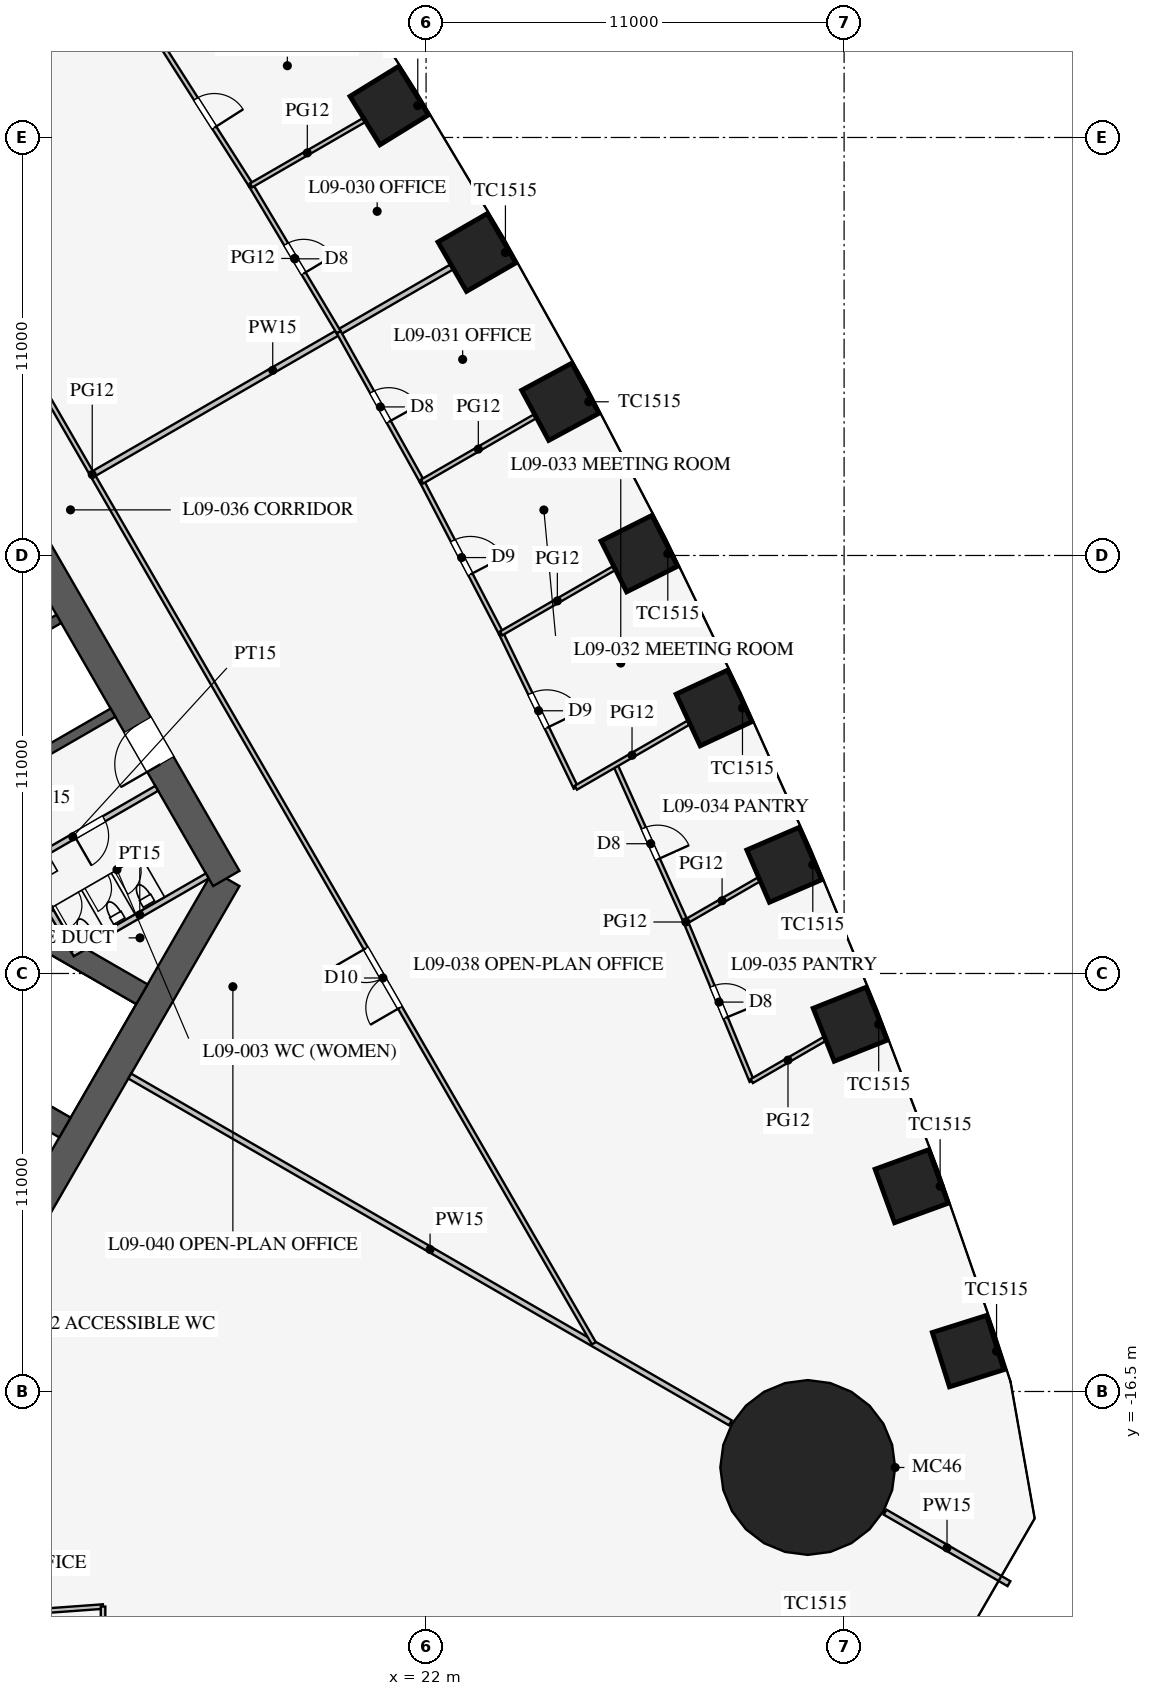
"""IFC4 building model, lengths in metres.
Left out: names, types, materials, properties, quantities, classifications, styles, units other than length and angle.
Written with IfcOpenShell. Run it as: python <this file> out.ifc"""

import sys

from ifc_helpers import new_model, si_unit, direction, frame, frame_2d, origin, origin_2d, place, context, subcontext, project, spatial, rectangle, circle, extrude, element, fill, save


model = new_model("IFC4")
c1 = context("Model", 3, precision=1e-05, world=origin(), true_north=direction((0.0, 1.0)))
c2 = subcontext(c1, "Body", "Model", "MODEL_VIEW")
j1 = project(units=[si_unit("LENGTHUNIT", "METRE"), si_unit("PLANEANGLEUNIT", "RADIAN")], contexts=[c1])
p1 = place(None, origin())
s1 = spatial("IfcSite", under=j1, at=p1, CompositionType="ELEMENT")
p2 = place(p1, origin())
s2 = spatial("IfcBuilding", under=s1, at=p2, CompositionType="ELEMENT")
p3 = place(p2, frame((0.0, 0.0, 41.7)))
s3 = spatial("IfcBuildingStorey", under=s2, at=p3, CompositionType="ELEMENT", Elevation=41.7)
for number, where, z_axis, x_axis in (
    (1, (36.262, -15.438, 0.0), (0.0, 0.0, 1.0), (-0.3, 0.954, 0.0)),
    (2, (34.776, -11.099, 0.0), (0.0, 0.0, 1.0), (-0.342, 0.94, 0.0)),
    (3, (33.16, -6.836, 0.0), (0.0, 0.0, 1.0), (-0.369, 0.929, 0.0)),
    (4, (31.426, -2.641, 0.0), (0.0, 0.0, 1.0), (-0.396, 0.918, 0.0)),
    (5, (29.576, 1.487, 0.0), (0.0, 0.0, 1.0), (-0.423, 0.906, 0.0)),
    (6, (27.611, 5.549, 0.0), (0.0, 0.0, 1.0), (-0.449, 0.894, 0.0)),
    (7, (25.531, 9.544, 0.0), (0.0, 0.0, 1.0), (-0.475, 0.88, 0.0)),
    (8, (23.338, 13.474, 0.0), (0.0, 0.0, 1.0), (-0.5, 0.866, 0.0)),
    (9, (21.031, 17.339, 0.0), (0.0, 0.0, 1.0), (-0.525, 0.851, 0.0)),
):
    element("IfcColumn", number, at=place(p3, frame(where, z_axis=z_axis, x_axis=x_axis)), inside=s3, PredefinedType="COLUMN", context=c2, shape_type="SweptSolid", body=[
        extrude(rectangle(XDim=1.5, YDim=1.5, at=origin_2d()), origin(), (0.0, 0.0, 1.0), 4.2),
    ])
p4 = place(p3, frame((32.043, -18.5, 0.0), z_axis=(0.0, 0.0, 1.0), x_axis=(1.0, 0.0, 0.0)))
e10 = element("IfcColumn", 10, at=p4, inside=s3, PredefinedType="COLUMN", context=c2, shape_type="SweptSolid", body=[
    extrude(circle(Radius=2.3, at=origin_2d()), origin(), (0.0, 0.0, 1.0), 4.2),
])
p5 = place(p3, frame((10.97, -13.0, 0.0), z_axis=(0.0, 0.0, 1.0), x_axis=(0.499995765644, 0.866027848477, 0.0)))
e11 = element("IfcWall", 11, at=p5, inside=s3, PredefinedType="SHEAR", context=c2, shape_type="SweptSolid", body=[
    extrude(rectangle(XDim=11.547, YDim=0.8, at=frame_2d((5.773, 0.0))), origin(), (0.0, 0.0, 1.0), 4.2),
])
p6 = place(p3, frame((16.743, -3.0, 0.0), z_axis=(0.0, 0.0, 1.0), x_axis=(-0.500002442456, 0.866023993627, 0.0)))
e12 = element("IfcWall", 12, at=p6, inside=s3, PredefinedType="SHEAR", context=c2, shape_type="SweptSolid", body=[
    extrude(rectangle(XDim=21.939, YDim=0.8, at=frame_2d((10.97, 0.0))), origin(), (0.0, 0.0, 1.0), 4.2),
])
p7 = place(p6, frame((17.27, 0.0, 0.0)))
e13 = element("IfcOpeningElement", 13, at=p7, cuts=e12, PredefinedType="OPENING", context=c2, shape_type="SweptSolid", body=[
    extrude(rectangle(XDim=1.2, YDim=2.1, at=frame_2d((0.6, 1.05))), frame((0.0, 0.41, 0.0), z_axis=(0.0, -1.0, 0.0), x_axis=(1.0, 0.0, 0.0)), (0.0, 0.0, 1.0), 0.82),
])
p8 = place(p6, frame((3.47, 0.0, 0.0)))
e14 = element("IfcOpeningElement", 14, at=p8, cuts=e12, PredefinedType="OPENING", context=c2, shape_type="SweptSolid", body=[
    extrude(rectangle(XDim=1.2, YDim=2.1, at=frame_2d((0.6, 1.05))), frame((0.0, 0.41, 0.0), z_axis=(0.0, -1.0, 0.0), x_axis=(1.0, 0.0, 0.0)), (0.0, 0.0, 1.0), 0.82),
])
for number, where, z_axis, x_axis in (
    (15, (11.532, 0.076, 0.0), (0.0, 0.0, 1.0), (0.866, 0.5, 0.0)),
    (16, (10.107, 2.544, 0.0), (0.0, 0.0, 1.0), (0.866, 0.5, 0.0)),
):
    element("IfcWall", number, at=place(p3, frame(where, z_axis=z_axis, x_axis=x_axis)), inside=s3, PredefinedType="SHEAR", context=c2, shape_type="SweptSolid", body=[
        extrude(rectangle(XDim=2.575, YDim=0.25, at=frame_2d((1.288, 0.0))), origin(), (0.0, 0.0, 1.0), 4.2),
    ])
for number, where, z_axis, x_axis in (
    (17, (4.638, -5.016, 0.0), (0.0, 0.0, 1.0), (0.866, -0.5, 0.0)),
    (18, (6.663, -1.509, 0.0), (0.0, 0.0, 1.0), (0.866, -0.5, 0.0)),
):
    element("IfcWall", number, at=place(p3, frame(where, z_axis=z_axis, x_axis=x_axis)), inside=s3, PredefinedType="SHEAR", context=c2, shape_type="SweptSolid", body=[
        extrude(rectangle(XDim=9.075, YDim=0.6, at=frame_2d((4.538, 0.0))), origin(), (0.0, 0.0, 1.0), 4.2),
    ])
p9 = place(p3, frame((10.495, -3.178, 0.0), z_axis=(0.0, 0.0, 1.0), x_axis=(0.86602216432, 0.500005610874, 0.0)))
e19 = element("IfcWall", 19, at=p9, inside=s3, PredefinedType="PARTITIONING", context=c2, shape_type="SweptSolid", body=[
    extrude(rectangle(XDim=5.1, YDim=0.15, at=frame_2d((2.55, 0.0))), origin(), (0.0, 0.0, 1.0), 4.0),
])
p10 = place(p9, frame((2.6, 0.0, 0.0)))
e20 = element("IfcOpeningElement", 20, at=p10, cuts=e19, PredefinedType="OPENING", context=c2, shape_type="SweptSolid", body=[
    extrude(rectangle(XDim=0.9, YDim=2.1, at=frame_2d((0.45, 1.05))), frame((0.0, 0.085, 0.0), z_axis=(0.0, -1.0, 0.0), x_axis=(1.0, 0.0, 0.0)), (0.0, 0.0, 1.0), 0.17),
])
p11 = place(p3, frame((12.691, -4.982, 0.0), z_axis=(0.0, 0.0, 1.0), x_axis=(0.8660249478, 0.500000789788, 0.0)))
e21 = element("IfcWall", 21, at=p11, inside=s3, PredefinedType="PARTITIONING", context=c2, shape_type="SweptSolid", body=[
    extrude(rectangle(XDim=4.1, YDim=0.15, at=frame_2d((2.05, 0.0))), origin(), (0.0, 0.0, 1.0), 4.0),
])
p12 = place(p3, frame((11.464, -2.706, 0.0), z_axis=(0.0, 0.0, 1.0), x_axis=(0.50001992892, -0.866013897511, 0.0)))
e22 = element("IfcWall", 22, at=p12, inside=s3, PredefinedType="PARTITIONING", context=c2, shape_type="SweptSolid", body=[
    extrude(rectangle(XDim=2.51, YDim=0.15, at=frame_2d((1.255, 0.0))), origin(), (0.0, 0.0, 1.0), 4.0),
])
p13 = place(p3, frame((14.203, -8.2, 0.0), z_axis=(0.0, 0.0, 1.0), x_axis=(0.866024965723, -0.500000758745, 0.0)))
e23 = element("IfcWall", 23, at=p13, inside=s3, PredefinedType="PARTITIONING", context=c2, shape_type="SweptSolid", body=[
    extrude(rectangle(XDim=18.25, YDim=0.15, at=frame_2d((9.125, 0.0))), origin(), (0.0, 0.0, 1.0), 2.3),
])
p14 = place(p3, frame((34.078, -19.675, 0.0), z_axis=(0.0, 0.0, 1.0), x_axis=(0.866019247219, -0.500010663332, 0.0)))
e24 = element("IfcWall", 24, at=p14, inside=s3, PredefinedType="PARTITIONING", context=c2, shape_type="SweptSolid", body=[
    extrude(rectangle(XDim=3.764, YDim=0.15, at=frame_2d((1.882, 0.0))), origin(), (0.0, 0.0, 1.0), 2.3),
])
p15 = place(p3, frame((9.0, -22.487, 0.0), z_axis=(0.0, 0.0, 1.0), x_axis=(0.997363894896, 0.072562119306, 0.0)))
e25 = element("IfcWall", 25, at=p15, inside=s3, PredefinedType="PARTITIONING", context=c2, shape_type="SweptSolid", body=[
    extrude(rectangle(XDim=4.512, YDim=0.12, at=frame_2d((2.256, 0.0))), origin(), (0.0, 0.0, 1.0), 2.9),
])
p16 = place(p15, frame((1.8, 0.0, 0.15)))
e26 = element("IfcOpeningElement", 26, at=p16, cuts=e25, PredefinedType="OPENING", context=c2, shape_type="SweptSolid", body=[
    extrude(rectangle(XDim=0.9, YDim=2.1, at=frame_2d((0.45, 1.05))), frame((0.0, 0.07, 0.0), z_axis=(0.0, -1.0, 0.0), x_axis=(1.0, 0.0, 0.0)), (0.0, 0.0, 1.0), 0.14),
])
p17 = place(p3, frame((13.5, -22.16, 0.0), z_axis=(0.0, 0.0, 1.0), x_axis=(0.0, -1.0, 0.0)))
e27 = element("IfcWall", 27, at=p17, inside=s3, PredefinedType="PARTITIONING", context=c2, shape_type="SweptSolid", body=[
    extrude(rectangle(XDim=3.414, YDim=0.12, at=frame_2d((1.707, 0.0))), origin(), (0.0, 0.0, 1.0), 2.9),
])
p18 = place(p3, frame((13.268, 7.66, 0.0), z_axis=(0.0, 0.0, 1.0), x_axis=(0.866017319748, 0.500014001701, 0.0)))
e28 = element("IfcWall", 28, at=p18, inside=s3, PredefinedType="PARTITIONING", context=c2, shape_type="SweptSolid", body=[
    extrude(rectangle(XDim=10.849, YDim=0.15, at=frame_2d((5.424, 0.0))), origin(), (0.0, 0.0, 1.0), 3.2),
])
p19 = place(p3, frame((26.415, -15.231, 0.0), z_axis=(0.0, 0.0, 1.0), x_axis=(-0.50000091641, 0.866024874695, 0.0)))
e29 = element("IfcWall", 29, at=p19, inside=s3, PredefinedType="PARTITIONING", context=c2, shape_type="SweptSolid", body=[
    extrude(rectangle(XDim=52.796, YDim=0.12, at=frame_2d((26.398, 0.0))), origin(), (0.0, 0.0, 1.0), 2.9),
])
p20 = place(p19, frame((10.2, 0.0, 0.15)))
e30 = element("IfcOpeningElement", 30, at=p20, cuts=e29, PredefinedType="OPENING", context=c2, shape_type="SweptSolid", body=[
    extrude(rectangle(XDim=1.8, YDim=2.1, at=frame_2d((0.9, 1.05))), frame((0.0, 0.07, 0.0), z_axis=(0.0, -1.0, 0.0), x_axis=(1.0, 0.0, 0.0)), (0.0, 0.0, 1.0), 0.14),
])
p21 = place(p19, frame((40.8, 0.0, 0.15)))
e31 = element("IfcOpeningElement", 31, at=p21, cuts=e29, PredefinedType="OPENING", context=c2, shape_type="SweptSolid", body=[
    extrude(rectangle(XDim=1.8, YDim=2.1, at=frame_2d((0.9, 1.05))), frame((0.0, 0.07, 0.0), z_axis=(0.0, -1.0, 0.0), x_axis=(1.0, 0.0, 0.0)), (0.0, 0.0, 1.0), 0.14),
])
p22 = place(p3, frame((19.701, 11.374, 0.0), z_axis=(0.0, 0.0, 1.0), x_axis=(-0.512483962191, 0.858696796604, 0.0)))
e32 = element("IfcWall", 32, at=p22, inside=s3, PredefinedType="PARTITIONING", context=c2, shape_type="SweptSolid", body=[
    extrude(rectangle(XDim=4.5, YDim=0.12, at=frame_2d((2.25, 0.0))), origin(), (0.0, 0.0, 1.0), 2.9),
])
p23 = place(p22, frame((1.8, 0.0, 0.15)))
e33 = element("IfcOpeningElement", 33, at=p23, cuts=e32, PredefinedType="OPENING", context=c2, shape_type="SweptSolid", body=[
    extrude(rectangle(XDim=0.9, YDim=2.1, at=frame_2d((0.45, 1.05))), frame((0.0, 0.07, 0.0), z_axis=(0.0, -1.0, 0.0), x_axis=(1.0, 0.0, 0.0)), (0.0, 0.0, 1.0), 0.14),
])
p24 = place(p3, frame((17.395, 15.239, 0.0), z_axis=(0.0, 0.0, 1.0), x_axis=(-0.537243691336, 0.843427066272, 0.0)))
e34 = element("IfcWall", 34, at=p24, inside=s3, PredefinedType="PARTITIONING", context=c2, shape_type="SweptSolid", body=[
    extrude(rectangle(XDim=4.504, YDim=0.12, at=frame_2d((2.252, 0.0))), origin(), (0.0, 0.0, 1.0), 2.9),
])
p25 = place(p24, frame((1.8, 0.0, 0.15)))
e35 = element("IfcOpeningElement", 35, at=p25, cuts=e34, PredefinedType="OPENING", context=c2, shape_type="SweptSolid", body=[
    extrude(rectangle(XDim=0.9, YDim=2.1, at=frame_2d((0.45, 1.05))), frame((0.0, 0.07, 0.0), z_axis=(0.0, -1.0, 0.0), x_axis=(1.0, 0.0, 0.0)), (0.0, 0.0, 1.0), 0.14),
])
p26 = place(p3, frame((25.941, -0.611, 0.0), z_axis=(0.0, 0.0, 1.0), x_axis=(-0.435857917556, 0.900015486369, 0.0)))
e36 = element("IfcWall", 36, at=p26, inside=s3, PredefinedType="PARTITIONING", context=c2, shape_type="SweptSolid", body=[
    extrude(rectangle(XDim=4.512, YDim=0.12, at=frame_2d((2.256, 0.0))), origin(), (0.0, 0.0, 1.0), 2.9),
])
p27 = place(p26, frame((1.75, 0.0, 0.15)))
e37 = element("IfcOpeningElement", 37, at=p27, cuts=e36, PredefinedType="OPENING", context=c2, shape_type="SweptSolid", body=[
    extrude(rectangle(XDim=1.0, YDim=2.1, at=frame_2d((0.5, 1.05))), frame((0.0, 0.07, 0.0), z_axis=(0.0, -1.0, 0.0), x_axis=(1.0, 0.0, 0.0)), (0.0, 0.0, 1.0), 0.14),
])
p28 = place(p3, frame((28.833, -4.138, 0.0), z_axis=(0.0, 0.0, 1.0), x_axis=(-0.409430894151, 0.912341132973, 0.0)))
e38 = element("IfcWall", 38, at=p28, inside=s3, PredefinedType="PARTITIONING", context=c2, shape_type="SweptSolid", body=[
    extrude(rectangle(XDim=4.523, YDim=0.12, at=frame_2d((2.262, 0.0))), origin(), (0.0, 0.0, 1.0), 2.9),
])
p29 = place(p28, frame((1.8, 0.0, 0.15)))
e39 = element("IfcOpeningElement", 39, at=p29, cuts=e38, PredefinedType="OPENING", context=c2, shape_type="SweptSolid", body=[
    extrude(rectangle(XDim=0.9, YDim=2.1, at=frame_2d((0.45, 1.05))), frame((0.0, 0.07, 0.0), z_axis=(0.0, -1.0, 0.0), x_axis=(1.0, 0.0, 0.0)), (0.0, 0.0, 1.0), 0.14),
])
p30 = place(p3, frame((30.569, -8.332, 0.0), z_axis=(0.0, 0.0, 1.0), x_axis=(-0.38265900014, 0.923889652292, 0.0)))
e40 = element("IfcWall", 40, at=p30, inside=s3, PredefinedType="PARTITIONING", context=c2, shape_type="SweptSolid", body=[
    extrude(rectangle(XDim=4.539, YDim=0.12, at=frame_2d((2.27, 0.0))), origin(), (0.0, 0.0, 1.0), 2.9),
])
p31 = place(p30, frame((1.8, 0.0, 0.15)))
e41 = element("IfcOpeningElement", 41, at=p31, cuts=e40, PredefinedType="OPENING", context=c2, shape_type="SweptSolid", body=[
    extrude(rectangle(XDim=0.9, YDim=2.1, at=frame_2d((0.45, 1.05))), frame((0.0, 0.07, 0.0), z_axis=(0.0, -1.0, 0.0), x_axis=(1.0, 0.0, 0.0)), (0.0, 0.0, 1.0), 0.14),
])
p32 = place(p3, frame((21.895, 7.445, 0.0), z_axis=(0.0, 0.0, 1.0), x_axis=(-0.487415216275, 0.87317031955, 0.0)))
e42 = element("IfcWall", 42, at=p32, inside=s3, PredefinedType="PARTITIONING", context=c2, shape_type="SweptSolid", body=[
    extrude(rectangle(XDim=4.5, YDim=0.12, at=frame_2d((2.25, 0.0))), origin(), (0.0, 0.0, 1.0), 2.9),
])
p33 = place(p32, frame((1.8, 0.0, 0.15)))
e43 = element("IfcOpeningElement", 43, at=p33, cuts=e42, PredefinedType="OPENING", context=c2, shape_type="SweptSolid", body=[
    extrude(rectangle(XDim=0.9, YDim=2.1, at=frame_2d((0.45, 1.05))), frame((0.0, 0.07, 0.0), z_axis=(0.0, -1.0, 0.0), x_axis=(1.0, 0.0, 0.0)), (0.0, 0.0, 1.0), 0.14),
])
p34 = place(p3, frame((23.975, 3.449, 0.0), z_axis=(0.0, 0.0, 1.0), x_axis=(-0.461810056307, 0.886978845235, 0.0)))
e44 = element("IfcWall", 44, at=p34, inside=s3, PredefinedType="PARTITIONING", context=c2, shape_type="SweptSolid", body=[
    extrude(rectangle(XDim=4.504, YDim=0.12, at=frame_2d((2.252, 0.0))), origin(), (0.0, 0.0, 1.0), 2.9),
])
p35 = place(p34, frame((1.75, 0.0, 0.15)))
e45 = element("IfcOpeningElement", 45, at=p35, cuts=e44, PredefinedType="OPENING", context=c2, shape_type="SweptSolid", body=[
    extrude(rectangle(XDim=1.0, YDim=2.1, at=frame_2d((0.5, 1.05))), frame((0.0, 0.07, 0.0), z_axis=(0.0, -1.0, 0.0), x_axis=(1.0, 0.0, 0.0)), (0.0, 0.0, 1.0), 0.14),
])
p36 = place(p3, frame((17.395, 15.239, 0.0), z_axis=(0.0, 0.0, 1.0), x_axis=(0.866015553834, 0.500017060227, 0.0)))
e46 = element("IfcWall", 46, at=p36, inside=s3, PredefinedType="PARTITIONING", context=c2, shape_type="SweptSolid", body=[
    extrude(rectangle(XDim=3.419, YDim=0.12, at=frame_2d((1.71, 0.0))), origin(), (0.0, 0.0, 1.0), 2.9),
])
p37 = place(p3, frame((25.941, -0.611, 0.0), z_axis=(0.0, 0.0, 1.0), x_axis=(0.866016478054, 0.500015459501, 0.0)))
e47 = element("IfcWall", 47, at=p37, inside=s3, PredefinedType="PARTITIONING", context=c2, shape_type="SweptSolid", body=[
    extrude(rectangle(XDim=3.414, YDim=0.12, at=frame_2d((1.707, 0.0))), origin(), (0.0, 0.0, 1.0), 2.9),
])
p38 = place(p3, frame((28.833, -4.138, 0.0), z_axis=(0.0, 0.0, 1.0), x_axis=(0.866010764432, 0.500025355245, 0.0)))
e48 = element("IfcWall", 48, at=p38, inside=s3, PredefinedType="PARTITIONING", context=c2, shape_type="SweptSolid", body=[
    extrude(rectangle(XDim=2.209, YDim=0.12, at=frame_2d((1.105, 0.0))), origin(), (0.0, 0.0, 1.0), 2.9),
])
p39 = place(p3, frame((30.569, -8.332, 0.0), z_axis=(0.0, 0.0, 1.0), x_axis=(0.86602503688, 0.500000635496, 0.0)))
e49 = element("IfcWall", 49, at=p39, inside=s3, PredefinedType="PARTITIONING", context=c2, shape_type="SweptSolid", body=[
    extrude(rectangle(XDim=2.203, YDim=0.12, at=frame_2d((1.102, 0.0))), origin(), (0.0, 0.0, 1.0), 2.9),
])
p40 = place(p3, frame((21.895, 7.445, 0.0), z_axis=(0.0, 0.0, 1.0), x_axis=(0.866015553834, 0.500017060227, 0.0)))
e50 = element("IfcWall", 50, at=p40, inside=s3, PredefinedType="PARTITIONING", context=c2, shape_type="SweptSolid", body=[
    extrude(rectangle(XDim=3.419, YDim=0.12, at=frame_2d((1.71, 0.0))), origin(), (0.0, 0.0, 1.0), 2.9),
])
p41 = place(p3, frame((23.975, 3.449, 0.0), z_axis=(0.0, 0.0, 1.0), x_axis=(0.866014265796, 0.500019291066, 0.0)))
e51 = element("IfcWall", 51, at=p41, inside=s3, PredefinedType="PARTITIONING", context=c2, shape_type="SweptSolid", body=[
    extrude(rectangle(XDim=3.417, YDim=0.12, at=frame_2d((1.708, 0.0))), origin(), (0.0, 0.0, 1.0), 2.9),
])
p42 = place(p10, frame((0.9, 0.0, 0.0), z_axis=(0.0, 0.0, 1.0), x_axis=(-1.0, 0.0, 0.0)))
e52 = element("IfcDoor", 52, at=p42, inside=s3, OperationType="SINGLE_SWING_RIGHT", PredefinedType="DOOR", context=c2, shape_type="SweptSolid", body=[
    extrude(rectangle(XDim=0.9, YDim=2.1, at=frame_2d((0.45, 1.05))), frame((0.0, 0.025, 0.0), z_axis=(0.0, -1.0, 0.0), x_axis=(1.0, 0.0, 0.0)), (0.0, 0.0, 1.0), 0.05),
])
fill(e20, e52)
p43 = place(p8, origin())
e53 = element("IfcDoor", 53, at=p43, inside=s3, OperationType="SINGLE_SWING_LEFT", PredefinedType="DOOR", context=c2, shape_type="SweptSolid", body=[
    extrude(rectangle(XDim=1.2, YDim=2.1, at=frame_2d((0.6, 1.05))), frame((0.0, 0.025, 0.0), z_axis=(0.0, -1.0, 0.0), x_axis=(1.0, 0.0, 0.0)), (0.0, 0.0, 1.0), 0.05),
])
fill(e14, e53)
p44 = place(p25, frame((0.9, 0.0, 0.0), z_axis=(0.0, 0.0, 1.0), x_axis=(-1.0, 0.0, 0.0)))
e54 = element("IfcDoor", 54, at=p44, inside=s3, OperationType="SINGLE_SWING_RIGHT", PredefinedType="DOOR", context=c2, shape_type="SweptSolid", body=[
    extrude(rectangle(XDim=0.9, YDim=2.1, at=frame_2d((0.45, 1.05))), frame((0.0, 0.025, 0.0), z_axis=(0.0, -1.0, 0.0), x_axis=(1.0, 0.0, 0.0)), (0.0, 0.0, 1.0), 0.05),
])
fill(e35, e54)
p45 = place(p23, frame((0.9, 0.0, 0.0), z_axis=(0.0, 0.0, 1.0), x_axis=(-1.0, 0.0, 0.0)))
e55 = element("IfcDoor", 55, at=p45, inside=s3, OperationType="SINGLE_SWING_RIGHT", PredefinedType="DOOR", context=c2, shape_type="SweptSolid", body=[
    extrude(rectangle(XDim=0.9, YDim=2.1, at=frame_2d((0.45, 1.05))), frame((0.0, 0.025, 0.0), z_axis=(0.0, -1.0, 0.0), x_axis=(1.0, 0.0, 0.0)), (0.0, 0.0, 1.0), 0.05),
])
fill(e33, e55)
p46 = place(p33, frame((0.9, 0.0, 0.0), z_axis=(0.0, 0.0, 1.0), x_axis=(-1.0, 0.0, 0.0)))
e56 = element("IfcDoor", 56, at=p46, inside=s3, OperationType="SINGLE_SWING_RIGHT", PredefinedType="DOOR", context=c2, shape_type="SweptSolid", body=[
    extrude(rectangle(XDim=0.9, YDim=2.1, at=frame_2d((0.45, 1.05))), frame((0.0, 0.025, 0.0), z_axis=(0.0, -1.0, 0.0), x_axis=(1.0, 0.0, 0.0)), (0.0, 0.0, 1.0), 0.05),
])
fill(e43, e56)
p47 = place(p35, frame((1.0, 0.0, 0.0), z_axis=(0.0, 0.0, 1.0), x_axis=(-1.0, 0.0, 0.0)))
e57 = element("IfcDoor", 57, at=p47, inside=s3, OperationType="SINGLE_SWING_RIGHT", PredefinedType="DOOR", context=c2, shape_type="SweptSolid", body=[
    extrude(rectangle(XDim=1.0, YDim=2.1, at=frame_2d((0.5, 1.05))), frame((0.0, 0.025, 0.0), z_axis=(0.0, -1.0, 0.0), x_axis=(1.0, 0.0, 0.0)), (0.0, 0.0, 1.0), 0.05),
])
fill(e45, e57)
p48 = place(p27, frame((1.0, 0.0, 0.0), z_axis=(0.0, 0.0, 1.0), x_axis=(-1.0, 0.0, 0.0)))
e58 = element("IfcDoor", 58, at=p48, inside=s3, OperationType="SINGLE_SWING_RIGHT", PredefinedType="DOOR", context=c2, shape_type="SweptSolid", body=[
    extrude(rectangle(XDim=1.0, YDim=2.1, at=frame_2d((0.5, 1.05))), frame((0.0, 0.025, 0.0), z_axis=(0.0, -1.0, 0.0), x_axis=(1.0, 0.0, 0.0)), (0.0, 0.0, 1.0), 0.05),
])
fill(e37, e58)
p49 = place(p29, frame((0.9, 0.0, 0.0), z_axis=(0.0, 0.0, 1.0), x_axis=(-1.0, 0.0, 0.0)))
e59 = element("IfcDoor", 59, at=p49, inside=s3, OperationType="SINGLE_SWING_RIGHT", PredefinedType="DOOR", context=c2, shape_type="SweptSolid", body=[
    extrude(rectangle(XDim=0.9, YDim=2.1, at=frame_2d((0.45, 1.05))), frame((0.0, 0.025, 0.0), z_axis=(0.0, -1.0, 0.0), x_axis=(1.0, 0.0, 0.0)), (0.0, 0.0, 1.0), 0.05),
])
fill(e39, e59)
p50 = place(p31, frame((0.9, 0.0, 0.0), z_axis=(0.0, 0.0, 1.0), x_axis=(-1.0, 0.0, 0.0)))
e60 = element("IfcDoor", 60, at=p50, inside=s3, OperationType="SINGLE_SWING_RIGHT", PredefinedType="DOOR", context=c2, shape_type="SweptSolid", body=[
    extrude(rectangle(XDim=0.9, YDim=2.1, at=frame_2d((0.45, 1.05))), frame((0.0, 0.025, 0.0), z_axis=(0.0, -1.0, 0.0), x_axis=(1.0, 0.0, 0.0)), (0.0, 0.0, 1.0), 0.05),
])
fill(e41, e60)
p51 = place(p20, origin())
e61 = element("IfcDoor", 61, at=p51, inside=s3, OperationType="DOUBLE_DOOR_SINGLE_SWING", PredefinedType="DOOR", context=c2, shape_type="SweptSolid", body=[
    extrude(rectangle(XDim=1.8, YDim=2.1, at=frame_2d((0.9, 1.05))), frame((0.0, 0.025, 0.0), z_axis=(0.0, -1.0, 0.0), x_axis=(1.0, 0.0, 0.0)), (0.0, 0.0, 1.0), 0.05),
])
fill(e30, e61)
save(model, sys.argv[1])
